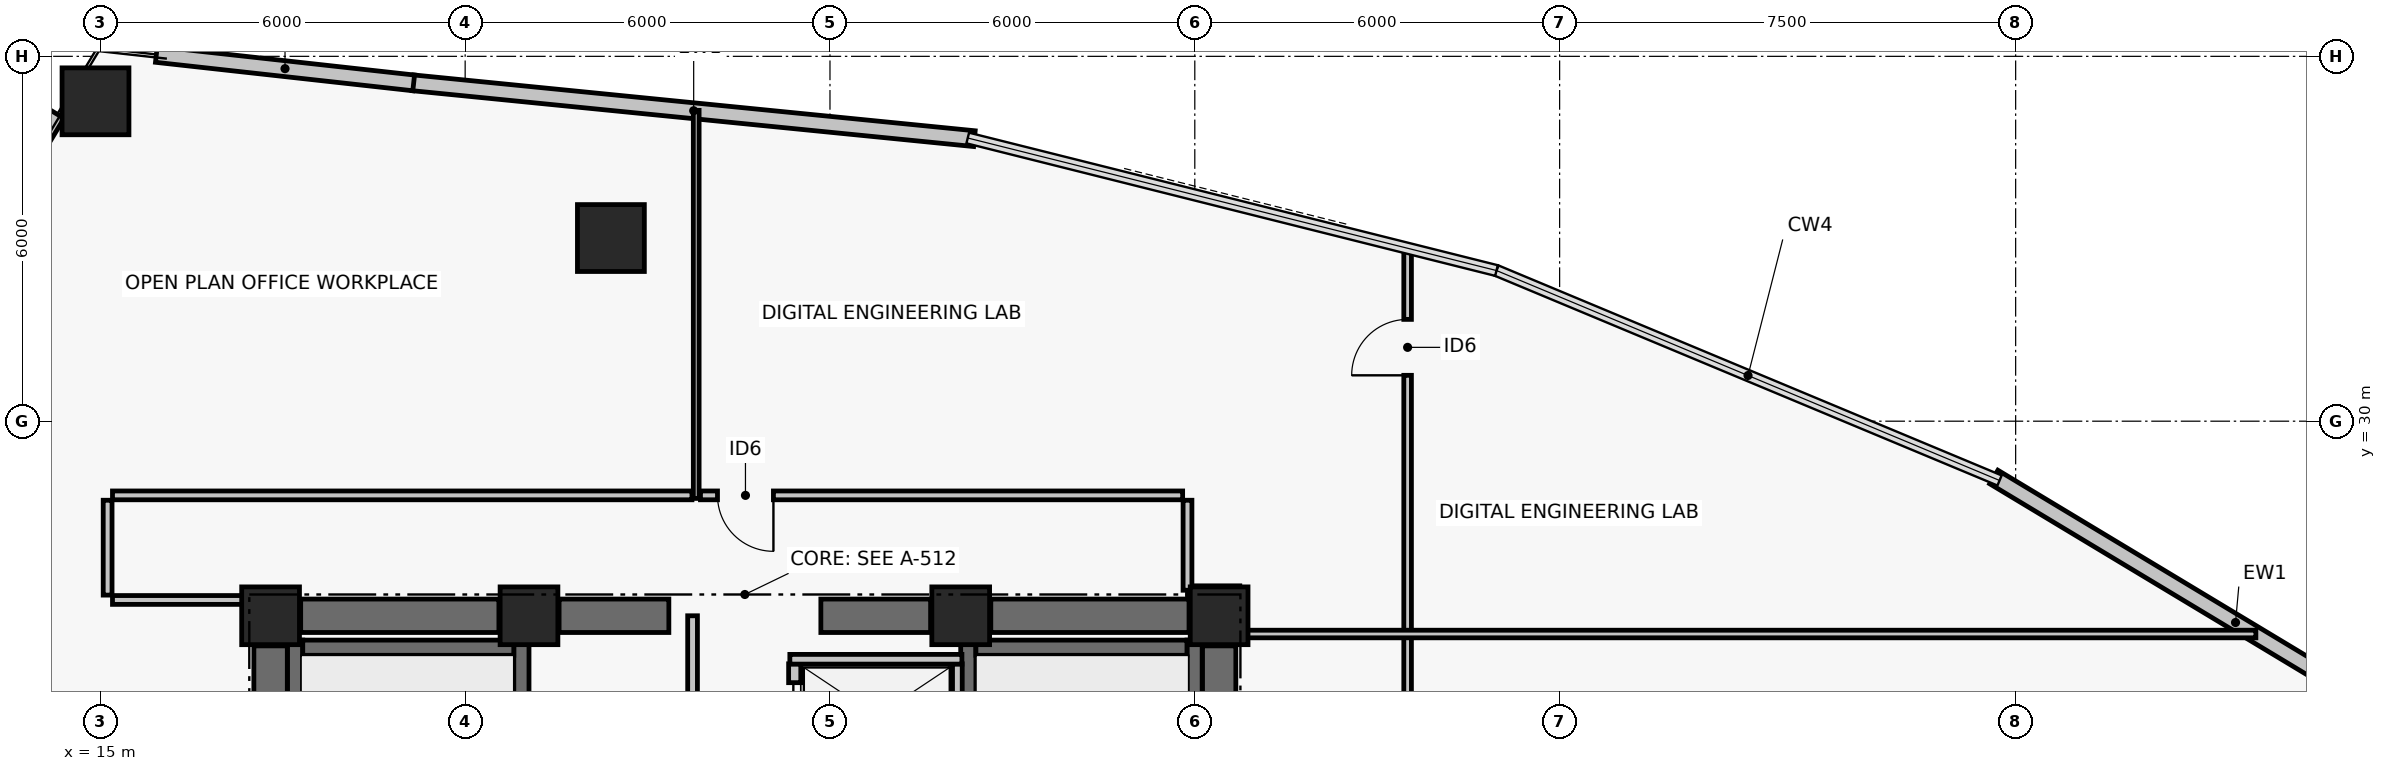
"""IFC4 building model, lengths in metres.
Left out: names, types, materials, properties, quantities, classifications, styles, units other than length and angle.
Written with IfcOpenShell. Run it as: python <this file> out.ifc"""

import sys

from ifc_helpers import new_model, si_unit, direction, frame, frame_2d, origin, origin_2d, place, context, subcontext, project, spatial, rectangle, hollow_rectangle, extrude, element, fill, save


model = new_model("IFC4")
c1 = context("Model", 3, precision=1e-05, world=origin(), true_north=direction((0.0, 1.0)))
c2 = subcontext(c1, "Body", "Model", "MODEL_VIEW")
j1 = project(units=[si_unit("LENGTHUNIT", "METRE"), si_unit("PLANEANGLEUNIT", "RADIAN")], contexts=[c1])
p1 = place(None, origin())
s1 = spatial("IfcSite", under=j1, at=p1, CompositionType="ELEMENT")
p2 = place(p1, origin())
s2 = spatial("IfcBuilding", under=s1, at=p2, CompositionType="ELEMENT")
p3 = place(p2, frame((0.0, 0.0, 154.32)))
s3 = spatial("IfcBuildingStorey", under=s2, at=p3, CompositionType="ELEMENT", Elevation=154.32)
for number, where, z_axis, x_axis in (
    (1, (17.8, 26.8, 0.0), (0.0, 0.0, 1.0), (1.0, 0.0, 0.0)),
    (2, (22.05, 26.8, 0.0), (0.0, 0.0, 1.0), (1.0, 0.0, 0.0)),
    (3, (29.15, 26.8, 0.0), (0.0, 0.0, 1.0), (1.0, 0.0, 0.0)),
    (4, (33.4, 26.8, 0.0), (0.0, 0.0, 1.0), (1.0, 0.0, 0.0)),
):
    element("IfcColumn", number, at=place(p3, frame(where, z_axis=z_axis, x_axis=x_axis)), inside=s3, PredefinedType="COLUMN", context=c2, shape_type="SweptSolid", body=[
        extrude(rectangle(XDim=0.95, YDim=0.95, at=origin_2d()), origin(), (0.0, 0.0, 1.0), 3.72),
    ])
p4 = place(p3, frame((18.295, 26.8, 0.0), z_axis=(0.0, 0.0, 1.0), x_axis=(1.0, 0.0, 0.0)))
e5 = element("IfcWall", 5, at=p4, inside=s3, PredefinedType="SHEAR", context=c2, shape_type="SweptSolid", body=[
    extrude(rectangle(XDim=3.26, YDim=0.55, at=frame_2d((1.63, 0.0))), origin(), (0.0, 0.0, 1.0), 3.5),
])
p5 = place(p3, frame((22.545, 26.8, 0.0), z_axis=(0.0, 0.0, 1.0), x_axis=(1.0, 0.0, 0.0)))
e6 = element("IfcWall", 6, at=p5, inside=s3, PredefinedType="SHEAR", context=c2, shape_type="SweptSolid", body=[
    extrude(rectangle(XDim=1.805, YDim=0.55, at=frame_2d((0.903, 0.0))), origin(), (0.0, 0.0, 1.0), 3.5),
])
p6 = place(p3, frame((26.85, 26.8, 0.0), z_axis=(0.0, 0.0, 1.0), x_axis=(1.0, 0.0, 0.0)))
e7 = element("IfcWall", 7, at=p6, inside=s3, PredefinedType="SHEAR", context=c2, shape_type="SweptSolid", body=[
    extrude(rectangle(XDim=1.805, YDim=0.55, at=frame_2d((0.902, 0.0))), origin(), (0.0, 0.0, 1.0), 3.5),
])
p7 = place(p3, frame((29.645, 26.8, 0.0), z_axis=(0.0, 0.0, 1.0), x_axis=(1.0, 0.0, 0.0)))
e8 = element("IfcWall", 8, at=p7, inside=s3, PredefinedType="SHEAR", context=c2, shape_type="SweptSolid", body=[
    extrude(rectangle(XDim=3.26, YDim=0.55, at=frame_2d((1.63, 0.0))), origin(), (0.0, 0.0, 1.0), 3.5),
])
for number, where, z_axis, x_axis in (
    (9, (17.8, 17.695, 0.0), (0.0, 0.0, 1.0), (0.0, 1.0, 0.0)),
    (10, (33.4, 17.695, 0.0), (0.0, 0.0, 1.0), (0.0, 1.0, 0.0)),
):
    element("IfcWall", number, at=place(p3, frame(where, z_axis=z_axis, x_axis=x_axis)), inside=s3, PredefinedType="SHEAR", context=c2, shape_type="SweptSolid", body=[
        extrude(rectangle(XDim=8.61, YDim=0.55, at=frame_2d((4.305, 0.0))), origin(), (0.0, 0.0, 1.0), 3.5),
    ])
p8 = place(p3, frame((18.204, 17.6, 0.0), z_axis=(0.0, 0.0, 1.0), x_axis=(0.0, 1.0, 0.0)))
e11 = element("IfcWall", 11, at=p8, inside=s3, PredefinedType="SHEAR", context=c2, shape_type="SweptSolid", body=[
    extrude(rectangle(XDim=8.8, YDim=0.25, at=frame_2d((4.4, 0.0))), origin(), (0.0, 0.0, 1.0), 3.5),
])
p9 = place(p3, frame((21.925, 17.6, 0.0), z_axis=(0.0, 0.0, 1.0), x_axis=(0.0, 1.0, 0.0)))
e12 = element("IfcWall", 12, at=p9, inside=s3, PredefinedType="SHEAR", context=c2, shape_type="SweptSolid", body=[
    extrude(rectangle(XDim=8.8, YDim=0.25, at=frame_2d((4.4, 0.0))), origin(), (0.0, 0.0, 1.0), 3.5),
])
p10 = place(p9, frame((0.35, 0.0, 0.0)))
e13 = element("IfcOpeningElement", 13, at=p10, cuts=e12, PredefinedType="OPENING", context=c2, shape_type="SweptSolid", body=[
    extrude(rectangle(XDim=1.05, YDim=2.08, at=frame_2d((0.525, 1.04))), frame((0.0, 0.135, 0.0), z_axis=(0.0, -1.0, 0.0), x_axis=(1.0, 0.0, 0.0)), (0.0, 0.0, 1.0), 0.27),
])
p11 = place(p3, frame((18.329, 26.275, 0.0), z_axis=(0.0, 0.0, 1.0), x_axis=(1.0, 0.0, 0.0)))
e14 = element("IfcWall", 14, at=p11, inside=s3, PredefinedType="SHEAR", context=c2, shape_type="SweptSolid", body=[
    extrude(rectangle(XDim=3.471, YDim=0.25, at=frame_2d((1.735, 0.0))), origin(), (0.0, 0.0, 1.0), 3.5),
])
p12 = place(p3, frame((29.275, 17.6, 0.0), z_axis=(0.0, 0.0, 1.0), x_axis=(0.0, 1.0, 0.0)))
e15 = element("IfcWall", 15, at=p12, inside=s3, PredefinedType="SHEAR", context=c2, shape_type="SweptSolid", body=[
    extrude(rectangle(XDim=8.8, YDim=0.25, at=frame_2d((4.4, 0.0))), origin(), (0.0, 0.0, 1.0), 3.5),
])
p13 = place(p12, frame((0.35, 0.0, 0.0)))
e16 = element("IfcOpeningElement", 16, at=p13, cuts=e15, PredefinedType="OPENING", context=c2, shape_type="SweptSolid", body=[
    extrude(rectangle(XDim=1.05, YDim=2.08, at=frame_2d((0.525, 1.04))), frame((0.0, 0.135, 0.0), z_axis=(0.0, -1.0, 0.0), x_axis=(1.0, 0.0, 0.0)), (0.0, 0.0, 1.0), 0.27),
])
p14 = place(p3, frame((32.996, 17.6, 0.0), z_axis=(0.0, 0.0, 1.0), x_axis=(0.0, 1.0, 0.0)))
e17 = element("IfcWall", 17, at=p14, inside=s3, PredefinedType="SHEAR", context=c2, shape_type="SweptSolid", body=[
    extrude(rectangle(XDim=8.8, YDim=0.25, at=frame_2d((4.4, 0.0))), origin(), (0.0, 0.0, 1.0), 3.5),
])
p15 = place(p3, frame((29.4, 26.275, 0.0), z_axis=(0.0, 0.0, 1.0), x_axis=(1.0, 0.0, 0.0)))
e18 = element("IfcWall", 18, at=p15, inside=s3, PredefinedType="SHEAR", context=c2, shape_type="SweptSolid", body=[
    extrude(rectangle(XDim=3.471, YDim=0.25, at=frame_2d((1.736, 0.0))), origin(), (0.0, 0.0, 1.0), 3.5),
])
for number, where, z_axis, x_axis in (
    (19, (23.397, 33.012, 0.0), (0.0, 0.0, 1.0), (1.0, 0.0, 0.0)),
    (20, (14.92, 35.26, 0.0), (0.0, 0.0, 1.0), (1.0, 0.0, 0.0)),
):
    element("IfcColumn", number, at=place(p3, frame(where, z_axis=z_axis, x_axis=x_axis)), inside=s3, PredefinedType="COLUMN", context=c2, shape_type="SweptSolid", body=[
        extrude(hollow_rectangle(XDim=1.1, YDim=1.1, WallThickness=0.045, at=origin_2d()), origin(), (0.0, 0.0, 1.0), 3.72),
    ])
p16 = place(p3, frame((46.141, 29.082, 0.0), z_axis=(0.0, 0.0, 1.0), x_axis=(0.856788694159, -0.515667658053, 0.0)))
e21 = element("IfcWall", 21, at=p16, inside=s3, PredefinedType="PARTITIONING", context=c2, shape_type="SweptSolid", body=[
    extrude(rectangle(XDim=9.279, YDim=0.26, at=frame_2d((4.64, 0.0))), origin(), (0.0, 0.0, 1.0), 3.5),
])
p17 = place(p3, frame((20.141, 35.565, 0.0), z_axis=(0.0, 0.0, 1.0), x_axis=(0.9950896707, -0.098977508888, 0.0)))
e22 = element("IfcWall", 22, at=p17, inside=s3, PredefinedType="PARTITIONING", context=c2, shape_type="SweptSolid", body=[
    extrude(rectangle(XDim=9.28, YDim=0.26, at=frame_2d((4.64, 0.0))), origin(), (0.0, 0.0, 1.0), 3.5),
])
p18 = place(p3, frame((15.921, 36.031, 0.0), z_axis=(0.0, 0.0, 1.0), x_axis=(0.993933978819, -0.109978387641, 0.0)))
e23 = element("IfcWall", 23, at=p18, inside=s3, PredefinedType="PARTITIONING", context=c2, shape_type="SweptSolid", body=[
    extrude(rectangle(XDim=4.258, YDim=0.26, at=frame_2d((2.129, 0.0))), origin(), (0.0, 0.0, 1.0), 3.5),
])
p19 = place(p3, frame((13.221, 33.272, 0.0), z_axis=(0.0, 0.0, 1.0), x_axis=(0.516157331647, 0.856493788061, 0.0)))
e24 = element("IfcWall", 24, at=p19, inside=s3, PredefinedType="PARTITIONING", context=c2, shape_type="SweptSolid", body=[
    extrude(rectangle(XDim=2.073, YDim=0.26, at=frame_2d((1.037, 0.0))), origin(), (0.0, 0.0, 1.0), 3.5),
])
p20 = place(p3, frame((26.42, 24.29, 0.0), z_axis=(0.0, 0.0, 1.0), x_axis=(0.0, 1.0, 0.0)))
e25 = element("IfcWall", 25, at=p20, inside=s3, PredefinedType="PARTITIONING", context=c2, shape_type="SweptSolid", body=[
    extrude(rectangle(XDim=1.72, YDim=0.2, at=frame_2d((0.86, 0.0))), origin(), (0.0, 0.0, 1.0), 3.5),
])
p21 = place(p20, frame((0.31, 0.0, 0.0)))
e26 = element("IfcOpeningElement", 26, at=p21, cuts=e25, PredefinedType="OPENING", context=c2, shape_type="SweptSolid", body=[
    extrude(rectangle(XDim=1.1, YDim=2.08, at=frame_2d((0.55, 1.04))), frame((0.0, 0.11, 0.0), z_axis=(0.0, -1.0, 0.0), x_axis=(1.0, 0.0, 0.0)), (0.0, 0.0, 1.0), 0.22),
])
p22 = place(p3, frame((29.095, 20.56, 0.0), z_axis=(0.0, 0.0, 1.0), x_axis=(0.0, 1.0, 0.0)))
e27 = element("IfcWall", 27, at=p22, inside=s3, PredefinedType="PARTITIONING", context=c2, shape_type="SweptSolid", body=[
    extrude(rectangle(XDim=5.45, YDim=0.16, at=frame_2d((2.725, 0.0))), origin(), (0.0, 0.0, 1.0), 3.5),
])
p23 = place(p3, frame((26.34, 26.085, 0.0), z_axis=(0.0, 0.0, 1.0), x_axis=(1.0, 0.0, 0.0)))
e28 = element("IfcWall", 28, at=p23, inside=s3, PredefinedType="PARTITIONING", context=c2, shape_type="SweptSolid", body=[
    extrude(rectangle(XDim=2.83, YDim=0.16, at=frame_2d((1.415, 0.0))), origin(), (0.0, 0.0, 1.0), 3.5),
])
p24 = place(p3, frame((24.74, 22.43, 0.0), z_axis=(0.0, 0.0, 1.0), x_axis=(0.0, 1.0, 0.0)))
e29 = element("IfcWall", 29, at=p24, inside=s3, PredefinedType="PARTITIONING", context=c2, shape_type="SweptSolid", body=[
    extrude(rectangle(XDim=4.37, YDim=0.16, at=frame_2d((2.185, 0.0))), origin(), (0.0, 0.0, 1.0), 2.63),
])
p25 = place(p24, frame((1.4, 0.0, 0.0)))
e30 = element("IfcOpeningElement", 30, at=p25, cuts=e29, PredefinedType="OPENING", context=c2, shape_type="SweptSolid", body=[
    extrude(rectangle(XDim=0.98, YDim=2.06, at=frame_2d((0.49, 1.03))), frame((0.0, 0.09, 0.0), z_axis=(0.0, -1.0, 0.0), x_axis=(1.0, 0.0, 0.0)), (0.0, 0.0, 1.0), 0.18),
])
p26 = place(p3, frame((33.74, 27.22, 0.0), z_axis=(0.0, 0.0, 1.0), x_axis=(-1.0, 0.0, 0.0)))
e31 = element("IfcWall", 31, at=p26, inside=s3, PredefinedType="PARTITIONING", context=c2, shape_type="SweptSolid", body=[
    extrude(rectangle(XDim=0.86, YDim=0.145, at=frame_2d((0.43, 0.0))), origin(), (0.0, 0.0, 1.0), 2.63),
])
p27 = place(p3, frame((32.88, 27.22, 0.0), z_axis=(0.0, 0.0, 1.0), x_axis=(0.0, 1.0, 0.0)))
e32 = element("IfcWall", 32, at=p27, inside=s3, PredefinedType="PARTITIONING", context=c2, shape_type="SweptSolid", body=[
    extrude(rectangle(XDim=1.48, YDim=0.145, at=frame_2d((0.74, 0.0))), origin(), (0.0, 0.0, 1.0), 2.63),
])
p28 = place(p3, frame((32.8, 28.78, 0.0), z_axis=(0.0, 0.0, 1.0), x_axis=(-1.0, 0.0, 0.0)))
e33 = element("IfcWall", 33, at=p28, inside=s3, PredefinedType="PARTITIONING", context=c2, shape_type="SweptSolid", body=[
    extrude(rectangle(XDim=7.93, YDim=0.145, at=frame_2d((3.965, 0.0))), origin(), (0.0, 0.0, 1.0), 2.93),
])
p29 = place(p28, frame((6.73, 0.0, 0.0)))
e34 = element("IfcOpeningElement", 34, at=p29, cuts=e33, PredefinedType="OPENING", context=c2, shape_type="SweptSolid", body=[
    extrude(rectangle(XDim=0.92, YDim=2.05, at=frame_2d((0.46, 1.025))), frame((0.0, 0.083, 0.0), z_axis=(0.0, -1.0, 0.0), x_axis=(1.0, 0.0, 0.0)), (0.0, 0.0, 1.0), 0.165),
])
p30 = place(p3, frame((24.73, 28.78, 0.0), z_axis=(0.0, 0.0, 1.0), x_axis=(-1.0, 0.0, 0.0)))
e35 = element("IfcWall", 35, at=p30, inside=s3, PredefinedType="PARTITIONING", context=c2, shape_type="SweptSolid", body=[
    extrude(rectangle(XDim=9.53, YDim=0.145, at=frame_2d((4.765, 0.0))), origin(), (0.0, 0.0, 1.0), 2.73),
])
p31 = place(p3, frame((15.12, 28.7, 0.0), z_axis=(0.0, 0.0, 1.0), x_axis=(0.0, -1.0, 0.0)))
e36 = element("IfcWall", 36, at=p31, inside=s3, PredefinedType="PARTITIONING", context=c2, shape_type="SweptSolid", body=[
    extrude(rectangle(XDim=1.56, YDim=0.145, at=frame_2d((0.78, 0.0))), origin(), (0.0, 0.0, 1.0), 2.73),
])
p32 = place(p3, frame((15.2, 27.06, 0.0), z_axis=(0.0, 0.0, 1.0), x_axis=(1.0, 0.0, 0.0)))
e37 = element("IfcWall", 37, at=p32, inside=s3, PredefinedType="PARTITIONING", context=c2, shape_type="SweptSolid", body=[
    extrude(rectangle(XDim=2.18, YDim=0.145, at=frame_2d((1.09, 0.0))), origin(), (0.0, 0.0, 1.0), 2.73),
])
p33 = place(p3, frame((24.8, 28.73, 0.0), z_axis=(0.0, 0.0, 1.0), x_axis=(0.0, 1.0, 0.0)))
e38 = element("IfcWall", 38, at=p33, inside=s3, PredefinedType="PARTITIONING", context=c2, shape_type="SweptSolid", body=[
    extrude(rectangle(XDim=6.381, YDim=0.095, at=frame_2d((3.191, 0.0))), origin(), (0.0, 0.0, 1.0), 2.93),
])
p34 = place(p3, frame((36.5, 11.146, 0.0), z_axis=(0.0, 0.0, 1.0), x_axis=(0.0, 1.0, 0.0)))
e39 = element("IfcWall", 39, at=p34, inside=s3, PredefinedType="PARTITIONING", context=c2, shape_type="SweptSolid", body=[
    extrude(rectangle(XDim=21.708, YDim=0.125, at=frame_2d((10.854, 0.0))), origin(), (0.0, 0.0, 1.0), 2.73),
])
p35 = place(p34, frame((1.18, 0.0, 0.0)))
e40 = element("IfcOpeningElement", 40, at=p35, cuts=e39, PredefinedType="OPENING", context=c2, shape_type="SweptSolid", body=[
    extrude(rectangle(XDim=0.92, YDim=2.05, at=frame_2d((0.46, 1.025))), frame((0.0, 0.073, 0.0), z_axis=(0.0, -1.0, 0.0), x_axis=(1.0, 0.0, 0.0)), (0.0, 0.0, 1.0), 0.145),
])
p36 = place(p34, frame((9.42, 0.0, 0.0)))
e41 = element("IfcOpeningElement", 41, at=p36, cuts=e39, PredefinedType="OPENING", context=c2, shape_type="SweptSolid", body=[
    extrude(rectangle(XDim=0.92, YDim=2.05, at=frame_2d((0.46, 1.025))), frame((0.0, 0.073, 0.0), z_axis=(0.0, -1.0, 0.0), x_axis=(1.0, 0.0, 0.0)), (0.0, 0.0, 1.0), 0.145),
])
p37 = place(p34, frame((19.609, 0.0, 0.0)))
e42 = element("IfcOpeningElement", 42, at=p37, cuts=e39, PredefinedType="OPENING", context=c2, shape_type="SweptSolid", body=[
    extrude(rectangle(XDim=0.92, YDim=2.05, at=frame_2d((0.46, 1.025))), frame((0.0, 0.073, 0.0), z_axis=(0.0, -1.0, 0.0), x_axis=(1.0, 0.0, 0.0)), (0.0, 0.0, 1.0), 0.145),
])
p38 = place(p3, frame((33.77, 26.5, 0.0), z_axis=(0.0, 0.0, 1.0), x_axis=(1.0, 0.0, 0.0)))
e43 = element("IfcWall", 43, at=p38, inside=s3, PredefinedType="PARTITIONING", context=c2, shape_type="SweptSolid", body=[
    extrude(rectangle(XDim=16.681, YDim=0.125, at=frame_2d((8.34, 0.0))), origin(), (0.0, 0.0, 1.0), 2.63),
])
p39 = place(p21, origin())
e44 = element("IfcDoor", 44, at=p39, inside=s3, OperationType="DOUBLE_DOOR_SLIDING", PredefinedType="DOOR", context=c2, shape_type="SweptSolid", body=[
    extrude(rectangle(XDim=1.1, YDim=2.08, at=frame_2d((0.55, 1.04))), frame((0.0, 0.025, 0.0), z_axis=(0.0, -1.0, 0.0), x_axis=(1.0, 0.0, 0.0)), (0.0, 0.0, 1.0), 0.05),
])
fill(e26, e44)
p40 = place(p29, origin())
e45 = element("IfcDoor", 45, at=p40, inside=s3, OperationType="SINGLE_SWING_LEFT", PredefinedType="DOOR", context=c2, shape_type="SweptSolid", body=[
    extrude(rectangle(XDim=0.92, YDim=2.05, at=frame_2d((0.46, 1.025))), frame((0.0, 0.025, 0.0), z_axis=(0.0, -1.0, 0.0), x_axis=(1.0, 0.0, 0.0)), (0.0, 0.0, 1.0), 0.05),
])
fill(e34, e45)
p41 = place(p37, origin())
e46 = element("IfcDoor", 46, at=p41, inside=s3, OperationType="SINGLE_SWING_LEFT", PredefinedType="DOOR", context=c2, shape_type="SweptSolid", body=[
    extrude(rectangle(XDim=0.92, YDim=2.05, at=frame_2d((0.46, 1.025))), frame((0.0, 0.025, 0.0), z_axis=(0.0, -1.0, 0.0), x_axis=(1.0, 0.0, 0.0)), (0.0, 0.0, 1.0), 0.05),
])
fill(e42, e46)
save(model, sys.argv[1])
